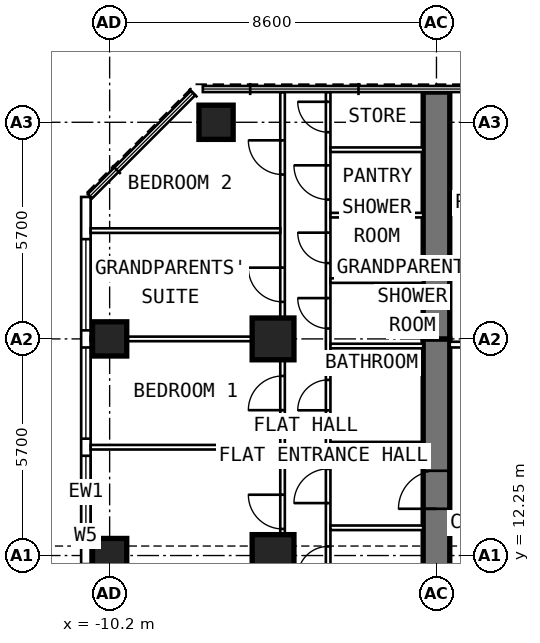
"""IFC4 building model, lengths in metres.
Left out: names, types, materials, properties, quantities, classifications, styles, units other than length and angle.
Written with IfcOpenShell. Run it as: python <this file> out.ifc"""

import sys

from ifc_helpers import new_model, si_unit, direction, frame, frame_2d, origin, origin_2d, place, context, subcontext, project, spatial, rectangle, extrude, element, fill, save


model = new_model("IFC4")
c1 = context("Model", 3, precision=1e-05, world=origin(), true_north=direction((0.0, 1.0)))
c2 = subcontext(c1, "Body", "Model", "MODEL_VIEW")
j1 = project(units=[si_unit("LENGTHUNIT", "METRE"), si_unit("PLANEANGLEUNIT", "RADIAN")], contexts=[c1])
p1 = place(None, origin())
s1 = spatial("IfcSite", under=j1, at=p1, CompositionType="ELEMENT")
p2 = place(p1, origin())
s2 = spatial("IfcBuilding", under=s1, at=p2, CompositionType="ELEMENT")
p3 = place(p2, frame((0.0, 0.0, 211.8)))
s3 = spatial("IfcBuildingStorey", under=s2, at=p3, CompositionType="ELEMENT", Elevation=211.8)
for number, where, z_axis, x_axis in (
    (1, (-10.2, 12.25, 0.0), (0.0, 0.0, 1.0), (0.0, 1.0, 0.0)),
    (2, (-10.2, 17.95, 0.0), (0.0, 0.0, 1.0), (0.0, 1.0, 0.0)),
    (3, (-7.4, 23.65, 0.0), (0.0, 0.0, 1.0), (0.0, 1.0, 0.0)),
):
    element("IfcColumn", number, at=place(p3, frame(where, z_axis=z_axis, x_axis=x_axis)), inside=s3, PredefinedType="COLUMN", context=c2, shape_type="SweptSolid", body=[
        extrude(rectangle(XDim=0.9, YDim=0.9, at=origin_2d()), origin(), (0.0, 0.0, 1.0), 3.6),
    ])
for number, where, z_axis, x_axis in (
    (4, (-5.9, 12.25, 0.0), (0.0, 0.0, 1.0), (0.0, 1.0, 0.0)),
    (5, (-5.9, 17.95, 0.0), (0.0, 0.0, 1.0), (0.0, 1.0, 0.0)),
):
    element("IfcColumn", number, at=place(p3, frame(where, z_axis=z_axis, x_axis=x_axis)), inside=s3, PredefinedType="COLUMN", context=c2, shape_type="SweptSolid", body=[
        extrude(rectangle(XDim=1.1, YDim=1.1, at=origin_2d()), origin(), (0.0, 0.0, 1.0), 3.6),
    ])
p4 = place(p3, frame((-1.6, 9.6, 0.0), z_axis=(0.0, 0.0, 1.0), x_axis=(0.0, 1.0, 0.0)))
e6 = element("IfcWall", 6, at=p4, inside=s3, PredefinedType="SHEAR", context=c2, shape_type="SweptSolid", body=[
    extrude(rectangle(XDim=8.35, YDim=0.7, at=frame_2d((4.175, 0.0))), origin(), (0.0, 0.0, 1.0), 3.6),
])
p5 = place(p4, frame((3.88, 0.0, 0.0)))
e7 = element("IfcOpeningElement", 7, at=p5, cuts=e6, PredefinedType="OPENING", context=c2, shape_type="SweptSolid", body=[
    extrude(rectangle(XDim=1.0, YDim=2.1, at=frame_2d((0.5, 1.05))), frame((0.0, 0.362, 0.0), z_axis=(0.0, -1.0, 0.0), x_axis=(1.0, 0.0, 0.0)), (0.0, 0.0, 1.0), 0.724),
])
p6 = place(p3, frame((-1.6, 17.95, 0.0), z_axis=(0.0, 0.0, 1.0), x_axis=(0.0, 1.0, 0.0)))
e8 = element("IfcWall", 8, at=p6, inside=s3, PredefinedType="SHEAR", context=c2, shape_type="SweptSolid", body=[
    extrude(rectangle(XDim=6.495, YDim=0.7, at=frame_2d((3.248, 0.0))), origin(), (0.0, 0.0, 1.0), 3.6),
])
p7 = place(p3, frame((-10.825, 6.148, 0.0), z_axis=(0.0, 0.0, 1.0), x_axis=(0.0, 1.0, 0.0)))
e9 = element("IfcWall", 9, at=p7, inside=s3, PredefinedType="SOLIDWALL", context=c2, shape_type="SweptSolid", body=[
    extrude(rectangle(XDim=15.537, YDim=0.25, at=frame_2d((7.769, 0.0))), origin(), (0.0, 0.0, 1.0), 3.35),
])
p8 = place(p7, frame((0.627, 0.0, 0.8)))
e10 = element("IfcOpeningElement", 10, at=p8, cuts=e9, PredefinedType="OPENING", context=c2, shape_type="SweptSolid", body=[
    extrude(rectangle(XDim=2.4, YDim=1.8, at=frame_2d((1.2, 0.9))), frame((0.0, 0.137, 0.0), z_axis=(0.0, -1.0, 0.0), x_axis=(1.0, 0.0, 0.0)), (0.0, 0.0, 1.0), 0.274),
])
p9 = place(p7, frame((3.477, 0.0, 0.8)))
e11 = element("IfcOpeningElement", 11, at=p9, cuts=e9, PredefinedType="OPENING", context=c2, shape_type="SweptSolid", body=[
    extrude(rectangle(XDim=2.4, YDim=1.8, at=frame_2d((1.2, 0.9))), frame((0.0, 0.137, 0.0), z_axis=(0.0, -1.0, 0.0), x_axis=(1.0, 0.0, 0.0)), (0.0, 0.0, 1.0), 0.274),
])
p10 = place(p7, frame((6.327, 0.0, 0.8)))
e12 = element("IfcOpeningElement", 12, at=p10, cuts=e9, PredefinedType="OPENING", context=c2, shape_type="SweptSolid", body=[
    extrude(rectangle(XDim=2.4, YDim=1.8, at=frame_2d((1.2, 0.9))), frame((0.0, 0.137, 0.0), z_axis=(0.0, -1.0, 0.0), x_axis=(1.0, 0.0, 0.0)), (0.0, 0.0, 1.0), 0.274),
])
p11 = place(p7, frame((9.177, 0.0, 0.8)))
e13 = element("IfcOpeningElement", 13, at=p11, cuts=e9, PredefinedType="OPENING", context=c2, shape_type="SweptSolid", body=[
    extrude(rectangle(XDim=2.4, YDim=1.8, at=frame_2d((1.2, 0.9))), frame((0.0, 0.137, 0.0), z_axis=(0.0, -1.0, 0.0), x_axis=(1.0, 0.0, 0.0)), (0.0, 0.0, 1.0), 0.274),
])
p12 = place(p7, frame((12.027, 0.0, 0.8)))
e14 = element("IfcOpeningElement", 14, at=p12, cuts=e9, PredefinedType="OPENING", context=c2, shape_type="SweptSolid", body=[
    extrude(rectangle(XDim=2.4, YDim=1.8, at=frame_2d((1.2, 0.9))), frame((0.0, 0.137, 0.0), z_axis=(0.0, -1.0, 0.0), x_axis=(1.0, 0.0, 0.0)), (0.0, 0.0, 1.0), 0.274),
])
p13 = place(p3, frame((-4.45, 9.925, 0.0), z_axis=(0.0, 0.0, 1.0), x_axis=(0.0, 1.0, 0.0)))
e15 = element("IfcWall", 15, at=p13, inside=s3, PredefinedType="PARTITIONING", context=c2, shape_type="SweptSolid", body=[
    extrude(rectangle(XDim=14.52, YDim=0.12, at=frame_2d((7.26, 0.0))), origin(), (0.0, 0.0, 1.0), 3.35),
])
p14 = place(p13, frame((1.765, 0.0, 0.0)))
e16 = element("IfcOpeningElement", 16, at=p14, cuts=e15, PredefinedType="OPENING", context=c2, shape_type="SweptSolid", body=[
    extrude(rectangle(XDim=0.8, YDim=2.1, at=frame_2d((0.4, 1.05))), frame((0.0, 0.072, 0.0), z_axis=(0.0, -1.0, 0.0), x_axis=(1.0, 0.0, 0.0)), (0.0, 0.0, 1.0), 0.144),
])
p15 = place(p13, frame((3.705, 0.0, 0.0)))
e17 = element("IfcOpeningElement", 17, at=p15, cuts=e15, PredefinedType="OPENING", context=c2, shape_type="SweptSolid", body=[
    extrude(rectangle(XDim=0.9, YDim=2.1, at=frame_2d((0.45, 1.05))), frame((0.0, 0.072, 0.0), z_axis=(0.0, -1.0, 0.0), x_axis=(1.0, 0.0, 0.0)), (0.0, 0.0, 1.0), 0.144),
])
p16 = place(p13, frame((6.146, 0.0, 0.0)))
e18 = element("IfcOpeningElement", 18, at=p16, cuts=e15, PredefinedType="OPENING", context=c2, shape_type="SweptSolid", body=[
    extrude(rectangle(XDim=0.8, YDim=2.1, at=frame_2d((0.4, 1.05))), frame((0.0, 0.072, 0.0), z_axis=(0.0, -1.0, 0.0), x_axis=(1.0, 0.0, 0.0)), (0.0, 0.0, 1.0), 0.144),
])
p17 = place(p13, frame((8.299, 0.0, 0.0)))
e19 = element("IfcOpeningElement", 19, at=p17, cuts=e15, PredefinedType="OPENING", context=c2, shape_type="SweptSolid", body=[
    extrude(rectangle(XDim=0.8, YDim=2.1, at=frame_2d((0.4, 1.05))), frame((0.0, 0.072, 0.0), z_axis=(0.0, -1.0, 0.0), x_axis=(1.0, 0.0, 0.0)), (0.0, 0.0, 1.0), 0.144),
])
p18 = place(p13, frame((10.021, 0.0, 0.0)))
e20 = element("IfcOpeningElement", 20, at=p18, cuts=e15, PredefinedType="OPENING", context=c2, shape_type="SweptSolid", body=[
    extrude(rectangle(XDim=0.8, YDim=2.1, at=frame_2d((0.4, 1.05))), frame((0.0, 0.072, 0.0), z_axis=(0.0, -1.0, 0.0), x_axis=(1.0, 0.0, 0.0)), (0.0, 0.0, 1.0), 0.144),
])
p19 = place(p13, frame((11.692, 0.0, 0.0)))
e21 = element("IfcOpeningElement", 21, at=p19, cuts=e15, PredefinedType="OPENING", context=c2, shape_type="SweptSolid", body=[
    extrude(rectangle(XDim=0.9, YDim=2.1, at=frame_2d((0.45, 1.05))), frame((0.0, 0.072, 0.0), z_axis=(0.0, -1.0, 0.0), x_axis=(1.0, 0.0, 0.0)), (0.0, 0.0, 1.0), 0.144),
])
p20 = place(p13, frame((13.464, 0.0, 0.0)))
e22 = element("IfcOpeningElement", 22, at=p20, cuts=e15, PredefinedType="OPENING", context=c2, shape_type="SweptSolid", body=[
    extrude(rectangle(XDim=0.8, YDim=2.1, at=frame_2d((0.4, 1.05))), frame((0.0, 0.072, 0.0), z_axis=(0.0, -1.0, 0.0), x_axis=(1.0, 0.0, 0.0)), (0.0, 0.0, 1.0), 0.144),
])
p21 = place(p3, frame((-5.65, 9.6, 0.0), z_axis=(0.0, 0.0, 1.0), x_axis=(0.0, 1.0, 0.0)))
e23 = element("IfcWall", 23, at=p21, inside=s3, PredefinedType="PARTITIONING", context=c2, shape_type="SweptSolid", body=[
    extrude(rectangle(XDim=14.845, YDim=0.12, at=frame_2d((7.422, 0.0))), origin(), (0.0, 0.0, 1.0), 3.35),
])
p22 = place(p21, frame((3.35, 0.0, 0.0)))
e24 = element("IfcOpeningElement", 24, at=p22, cuts=e23, PredefinedType="OPENING", context=c2, shape_type="SweptSolid", body=[
    extrude(rectangle(XDim=0.9, YDim=2.1, at=frame_2d((0.45, 1.05))), frame((0.0, 0.072, 0.0), z_axis=(0.0, -1.0, 0.0), x_axis=(1.0, 0.0, 0.0)), (0.0, 0.0, 1.0), 0.144),
])
p23 = place(p21, frame((6.475, 0.0, 0.0)))
e25 = element("IfcOpeningElement", 25, at=p23, cuts=e23, PredefinedType="OPENING", context=c2, shape_type="SweptSolid", body=[
    extrude(rectangle(XDim=0.9, YDim=2.1, at=frame_2d((0.45, 1.05))), frame((0.0, 0.072, 0.0), z_axis=(0.0, -1.0, 0.0), x_axis=(1.0, 0.0, 0.0)), (0.0, 0.0, 1.0), 0.144),
])
p24 = place(p21, frame((9.325, 0.0, 0.0)))
e26 = element("IfcOpeningElement", 26, at=p24, cuts=e23, PredefinedType="OPENING", context=c2, shape_type="SweptSolid", body=[
    extrude(rectangle(XDim=0.9, YDim=2.1, at=frame_2d((0.45, 1.05))), frame((0.0, 0.072, 0.0), z_axis=(0.0, -1.0, 0.0), x_axis=(1.0, 0.0, 0.0)), (0.0, 0.0, 1.0), 0.144),
])
p25 = place(p21, frame((12.675, 0.0, 0.0)))
e27 = element("IfcOpeningElement", 27, at=p25, cuts=e23, PredefinedType="OPENING", context=c2, shape_type="SweptSolid", body=[
    extrude(rectangle(XDim=0.9, YDim=2.1, at=frame_2d((0.45, 1.05))), frame((0.0, 0.072, 0.0), z_axis=(0.0, -1.0, 0.0), x_axis=(1.0, 0.0, 0.0)), (0.0, 0.0, 1.0), 0.144),
])
p26 = place(p3, frame((-5.71, 15.1, 0.0), z_axis=(0.0, 0.0, 1.0), x_axis=(-1.0, 0.0, 0.0)))
e28 = element("IfcWall", 28, at=p26, inside=s3, PredefinedType="PARTITIONING", context=c2, shape_type="SweptSolid", body=[
    extrude(rectangle(XDim=4.99, YDim=0.12, at=frame_2d((2.495, 0.0))), origin(), (0.0, 0.0, 1.0), 3.35),
])
p27 = place(p3, frame((-5.71, 17.95, 0.0), z_axis=(0.0, 0.0, 1.0), x_axis=(-1.0, 0.0, 0.0)))
e29 = element("IfcWall", 29, at=p27, inside=s3, PredefinedType="PARTITIONING", context=c2, shape_type="SweptSolid", body=[
    extrude(rectangle(XDim=4.99, YDim=0.12, at=frame_2d((2.495, 0.0))), origin(), (0.0, 0.0, 1.0), 2.45),
])
p28 = place(p3, frame((-5.71, 20.8, 0.0), z_axis=(0.0, 0.0, 1.0), x_axis=(-1.0, 0.0, 0.0)))
e30 = element("IfcWall", 30, at=p28, inside=s3, PredefinedType="PARTITIONING", context=c2, shape_type="SweptSolid", body=[
    extrude(rectangle(XDim=4.99, YDim=0.12, at=frame_2d((2.495, 0.0))), origin(), (0.0, 0.0, 1.0), 3.35),
])
for number, where, z_axis, x_axis in (
    (31, (-1.95, 12.98, 0.0), (0.0, 0.0, 1.0), (-1.0, 0.0, 0.0)),
    (32, (-1.95, 15.18, 0.0), (0.0, 0.0, 1.0), (-1.0, 0.0, 0.0)),
):
    element("IfcWall", number, at=place(p3, frame(where, z_axis=z_axis, x_axis=x_axis)), inside=s3, PredefinedType="PARTITIONING", context=c2, shape_type="SweptSolid", body=[
        extrude(rectangle(XDim=2.44, YDim=0.12, at=frame_2d((1.22, 0.0))), origin(), (0.0, 0.0, 1.0), 3.35),
    ])
p29 = place(p3, frame((-1.95, 17.763, 0.0), z_axis=(0.0, 0.0, 1.0), x_axis=(-1.0, 0.0, 0.0)))
e33 = element("IfcWall", 33, at=p29, inside=s3, PredefinedType="PARTITIONING", context=c2, shape_type="SweptSolid", body=[
    extrude(rectangle(XDim=2.44, YDim=0.12, at=frame_2d((1.22, 0.0))), origin(), (0.0, 0.0, 1.0), 2.45),
])
for number, where, z_axis, x_axis in (
    (34, (-1.95, 19.485, 0.0), (0.0, 0.0, 1.0), (-1.0, 0.0, 0.0)),
    (35, (-1.95, 21.206, 0.0), (0.0, 0.0, 1.0), (-1.0, 0.0, 0.0)),
    (36, (-1.95, 22.928, 0.0), (0.0, 0.0, 1.0), (-1.0, 0.0, 0.0)),
):
    element("IfcWall", number, at=place(p3, frame(where, z_axis=z_axis, x_axis=x_axis)), inside=s3, PredefinedType="PARTITIONING", context=c2, shape_type="SweptSolid", body=[
        extrude(rectangle(XDim=2.44, YDim=0.12, at=frame_2d((1.22, 0.0))), origin(), (0.0, 0.0, 1.0), 3.35),
    ])
p30 = place(p3, frame((1.25, 17.8, 0.0), z_axis=(0.0, 0.0, 1.0), x_axis=(-1.0, 0.0, 0.0)))
e37 = element("IfcWall", 37, at=p30, inside=s3, PredefinedType="PARTITIONING", context=c2, shape_type="SweptSolid", body=[
    extrude(rectangle(XDim=2.5, YDim=0.15, at=frame_2d((1.25, 0.0))), origin(), (0.0, 0.0, 1.0), 3.35),
])
p31 = place(p30, frame((0.75, 0.0, 0.0)))
e38 = element("IfcOpeningElement", 38, at=p31, cuts=e37, PredefinedType="OPENING", context=c2, shape_type="SweptSolid", body=[
    extrude(rectangle(XDim=1.0, YDim=2.1, at=frame_2d((0.5, 1.05))), frame((0.0, 0.087, 0.0), z_axis=(0.0, -1.0, 0.0), x_axis=(1.0, 0.0, 0.0)), (0.0, 0.0, 1.0), 0.174),
])
p32 = place(p10, origin())
e39 = element("IfcWindow", 39, at=p32, inside=s3, PartitioningType="SINGLE_PANEL", PredefinedType="WINDOW", context=c2, shape_type="SweptSolid", body=[
    extrude(rectangle(XDim=2.4, YDim=1.8, at=frame_2d((1.2, 0.9))), frame((0.0, 0.03, 0.0), z_axis=(0.0, -1.0, 0.0), x_axis=(1.0, 0.0, 0.0)), (0.0, 0.0, 1.0), 0.06),
])
fill(e12, e39)
p33 = place(p11, origin())
e40 = element("IfcWindow", 40, at=p33, inside=s3, PartitioningType="SINGLE_PANEL", PredefinedType="WINDOW", context=c2, shape_type="SweptSolid", body=[
    extrude(rectangle(XDim=2.4, YDim=1.8, at=frame_2d((1.2, 0.9))), frame((0.0, 0.03, 0.0), z_axis=(0.0, -1.0, 0.0), x_axis=(1.0, 0.0, 0.0)), (0.0, 0.0, 1.0), 0.06),
])
fill(e13, e40)
p34 = place(p12, origin())
e41 = element("IfcWindow", 41, at=p34, inside=s3, PartitioningType="SINGLE_PANEL", PredefinedType="WINDOW", context=c2, shape_type="SweptSolid", body=[
    extrude(rectangle(XDim=2.4, YDim=1.8, at=frame_2d((1.2, 0.9))), frame((0.0, 0.03, 0.0), z_axis=(0.0, -1.0, 0.0), x_axis=(1.0, 0.0, 0.0)), (0.0, 0.0, 1.0), 0.06),
])
fill(e14, e41)
p35 = place(p5, origin())
e42 = element("IfcDoor", 42, at=p35, inside=s3, OperationType="SINGLE_SWING_LEFT", PredefinedType="DOOR", context=c2, shape_type="SweptSolid", body=[
    extrude(rectangle(XDim=1.0, YDim=2.1, at=frame_2d((0.5, 1.05))), frame((0.0, 0.1, 0.0), z_axis=(0.0, -1.0, 0.0), x_axis=(1.0, 0.0, 0.0)), (0.0, 0.0, 1.0), 0.2),
])
fill(e7, e42)
p36 = place(p22, origin())
e43 = element("IfcDoor", 43, at=p36, inside=s3, OperationType="SINGLE_SWING_RIGHT", PredefinedType="DOOR", context=c2, shape_type="SweptSolid", body=[
    extrude(rectangle(XDim=0.9, YDim=2.1, at=frame_2d((0.45, 1.05))), frame((0.0, 0.025, 0.0), z_axis=(0.0, -1.0, 0.0), x_axis=(1.0, 0.0, 0.0)), (0.0, 0.0, 1.0), 0.05),
])
fill(e24, e43)
p37 = place(p23, origin())
e44 = element("IfcDoor", 44, at=p37, inside=s3, OperationType="SINGLE_SWING_LEFT", PredefinedType="DOOR", context=c2, shape_type="SweptSolid", body=[
    extrude(rectangle(XDim=0.9, YDim=2.1, at=frame_2d((0.45, 1.05))), frame((0.0, 0.025, 0.0), z_axis=(0.0, -1.0, 0.0), x_axis=(1.0, 0.0, 0.0)), (0.0, 0.0, 1.0), 0.05),
])
fill(e25, e44)
p38 = place(p24, origin())
e45 = element("IfcDoor", 45, at=p38, inside=s3, OperationType="SINGLE_SWING_RIGHT", PredefinedType="DOOR", context=c2, shape_type="SweptSolid", body=[
    extrude(rectangle(XDim=0.9, YDim=2.1, at=frame_2d((0.45, 1.05))), frame((0.0, 0.025, 0.0), z_axis=(0.0, -1.0, 0.0), x_axis=(1.0, 0.0, 0.0)), (0.0, 0.0, 1.0), 0.05),
])
fill(e26, e45)
p39 = place(p25, origin())
e46 = element("IfcDoor", 46, at=p39, inside=s3, OperationType="SINGLE_SWING_RIGHT", PredefinedType="DOOR", context=c2, shape_type="SweptSolid", body=[
    extrude(rectangle(XDim=0.9, YDim=2.1, at=frame_2d((0.45, 1.05))), frame((0.0, 0.025, 0.0), z_axis=(0.0, -1.0, 0.0), x_axis=(1.0, 0.0, 0.0)), (0.0, 0.0, 1.0), 0.05),
])
fill(e27, e46)
p40 = place(p14, origin())
e47 = element("IfcDoor", 47, at=p40, inside=s3, OperationType="SINGLE_SWING_LEFT", PredefinedType="DOOR", context=c2, shape_type="SweptSolid", body=[
    extrude(rectangle(XDim=0.8, YDim=2.1, at=frame_2d((0.4, 1.05))), frame((0.0, 0.025, 0.0), z_axis=(0.0, -1.0, 0.0), x_axis=(1.0, 0.0, 0.0)), (0.0, 0.0, 1.0), 0.05),
])
fill(e16, e47)
p41 = place(p15, origin())
e48 = element("IfcDoor", 48, at=p41, inside=s3, OperationType="SINGLE_SWING_LEFT", PredefinedType="DOOR", context=c2, shape_type="SweptSolid", body=[
    extrude(rectangle(XDim=0.9, YDim=2.1, at=frame_2d((0.45, 1.05))), frame((0.0, 0.025, 0.0), z_axis=(0.0, -1.0, 0.0), x_axis=(1.0, 0.0, 0.0)), (0.0, 0.0, 1.0), 0.05),
])
fill(e17, e48)
p42 = place(p16, origin())
e49 = element("IfcDoor", 49, at=p42, inside=s3, OperationType="SINGLE_SWING_LEFT", PredefinedType="DOOR", context=c2, shape_type="SweptSolid", body=[
    extrude(rectangle(XDim=0.8, YDim=2.1, at=frame_2d((0.4, 1.05))), frame((0.0, 0.025, 0.0), z_axis=(0.0, -1.0, 0.0), x_axis=(1.0, 0.0, 0.0)), (0.0, 0.0, 1.0), 0.05),
])
fill(e18, e49)
p43 = place(p17, origin())
e50 = element("IfcDoor", 50, at=p43, inside=s3, OperationType="SINGLE_SWING_RIGHT", PredefinedType="DOOR", context=c2, shape_type="SweptSolid", body=[
    extrude(rectangle(XDim=0.8, YDim=2.1, at=frame_2d((0.4, 1.05))), frame((0.0, 0.025, 0.0), z_axis=(0.0, -1.0, 0.0), x_axis=(1.0, 0.0, 0.0)), (0.0, 0.0, 1.0), 0.05),
])
fill(e19, e50)
p44 = place(p18, origin())
e51 = element("IfcDoor", 51, at=p44, inside=s3, OperationType="SINGLE_SWING_RIGHT", PredefinedType="DOOR", context=c2, shape_type="SweptSolid", body=[
    extrude(rectangle(XDim=0.8, YDim=2.1, at=frame_2d((0.4, 1.05))), frame((0.0, 0.025, 0.0), z_axis=(0.0, -1.0, 0.0), x_axis=(1.0, 0.0, 0.0)), (0.0, 0.0, 1.0), 0.05),
])
fill(e20, e51)
p45 = place(p19, origin())
e52 = element("IfcDoor", 52, at=p45, inside=s3, OperationType="SINGLE_SWING_RIGHT", PredefinedType="DOOR", context=c2, shape_type="SweptSolid", body=[
    extrude(rectangle(XDim=0.9, YDim=2.1, at=frame_2d((0.45, 1.05))), frame((0.0, 0.025, 0.0), z_axis=(0.0, -1.0, 0.0), x_axis=(1.0, 0.0, 0.0)), (0.0, 0.0, 1.0), 0.05),
])
fill(e21, e52)
p46 = place(p20, origin())
e53 = element("IfcDoor", 53, at=p46, inside=s3, OperationType="SINGLE_SWING_RIGHT", PredefinedType="DOOR", context=c2, shape_type="SweptSolid", body=[
    extrude(rectangle(XDim=0.8, YDim=2.1, at=frame_2d((0.4, 1.05))), frame((0.0, 0.025, 0.0), z_axis=(0.0, -1.0, 0.0), x_axis=(1.0, 0.0, 0.0)), (0.0, 0.0, 1.0), 0.05),
])
fill(e22, e53)
save(model, sys.argv[1])
